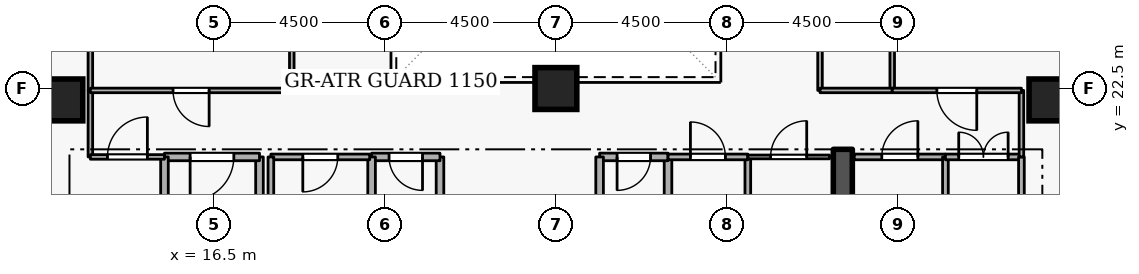
"""IFC4 building model, lengths in metres.
Left out: names, types, materials, properties, quantities, classifications, styles, units other than length and angle.
Written with IfcOpenShell. Run it as: python <this file> out.ifc"""

import sys

from ifc_helpers import new_model, si_unit, direction, frame, frame_2d, origin, origin_2d, place, context, subcontext, project, spatial, rectangle, extrude, element, fill, save


model = new_model("IFC4")
c1 = context("Model", 3, precision=1e-05, world=origin(), true_north=direction((0.0, 1.0)))
c2 = subcontext(c1, "Body", "Model", "MODEL_VIEW")
j1 = project(units=[si_unit("LENGTHUNIT", "METRE"), si_unit("PLANEANGLEUNIT", "RADIAN")], contexts=[c1])
p1 = place(None, origin())
s1 = spatial("IfcSite", under=j1, at=p1, CompositionType="ELEMENT")
p2 = place(p1, origin())
s2 = spatial("IfcBuilding", under=s1, at=p2, CompositionType="ELEMENT")
p3 = place(p2, frame((0.0, 0.0, 196.5)))
s3 = spatial("IfcBuildingStorey", under=s2, at=p3, CompositionType="ELEMENT", Elevation=196.5)
p4 = place(p3, frame((33.05, 15.1, 0.0), z_axis=(0.0, 0.0, 1.0), x_axis=(0.0, 1.0, 0.0)))
e1 = element("IfcWall", 1, at=p4, inside=s3, PredefinedType="SHEAR", context=c2, shape_type="SweptSolid", body=[
    extrude(rectangle(XDim=5.8, YDim=0.5, at=frame_2d((2.9, 0.0))), origin(), (0.0, 0.0, 1.0), 3.6),
])
for number, where, z_axis, x_axis in (
    (2, (12.5, 22.2, 0.0), (0.0, 0.0, 1.0), (1.0, 0.0, 0.0)),
    (3, (38.5, 22.2, 0.0), (0.0, 0.0, 1.0), (1.0, 0.0, 0.0)),
    (4, (25.5, 22.5, 0.0), (0.0, 0.0, 1.0), (1.0, 0.0, 0.0)),
):
    element("IfcColumn", number, at=place(p3, frame(where, z_axis=z_axis, x_axis=x_axis)), inside=s3, PredefinedType="COLUMN", context=c2, shape_type="SweptSolid", body=[
        extrude(rectangle(XDim=1.1, YDim=1.1, at=origin_2d()), origin(), (0.0, 0.0, 1.0), 3.6),
    ])
p5 = place(p3, frame((17.7, 18.4, 0.0), z_axis=(0.0, 0.0, 1.0), x_axis=(0.0, 1.0, 0.0)))
e5 = element("IfcWall", 5, at=p5, inside=s3, PredefinedType="STANDARD", context=c2, shape_type="SweptSolid", body=[
    extrude(rectangle(XDim=2.3, YDim=0.2, at=frame_2d((1.15, 0.0))), origin(), (0.0, 0.0, 1.0), 2.525),
])
p6 = place(p3, frame((17.7, 20.7, 0.0), z_axis=(0.0, 0.0, 1.0), x_axis=(-1.0, 0.0, 0.0)))
e6 = element("IfcWall", 6, at=p6, inside=s3, PredefinedType="STANDARD", context=c2, shape_type="SweptSolid", body=[
    extrude(rectangle(XDim=2.5, YDim=0.2, at=frame_2d((1.25, 0.0))), origin(), (0.0, 0.0, 1.0), 3.32),
])
p7 = place(p6, frame((0.675, 0.0, 0.0)))
e7 = element("IfcOpeningElement", 7, at=p7, cuts=e6, PredefinedType="OPENING", context=c2, shape_type="SweptSolid", body=[
    extrude(rectangle(XDim=1.15, YDim=2.1, at=frame_2d((0.575, 1.05))), frame((0.0, 0.11, 0.0), z_axis=(0.0, -1.0, 0.0), x_axis=(1.0, 0.0, 0.0)), (0.0, 0.0, 1.0), 0.22),
])
p8 = place(p3, frame((15.2, 20.7, 0.0), z_axis=(0.0, 0.0, 1.0), x_axis=(0.0, -1.0, 0.0)))
e8 = element("IfcWall", 8, at=p8, inside=s3, PredefinedType="STANDARD", context=c2, shape_type="SweptSolid", body=[
    extrude(rectangle(XDim=5.7, YDim=0.2, at=frame_2d((2.85, 0.0))), origin(), (0.0, 0.0, 1.0), 3.32),
])
p9 = place(p3, frame((28.45, 18.65, 0.0), z_axis=(0.0, 0.0, 1.0), x_axis=(0.0, 1.0, 0.0)))
e9 = element("IfcWall", 9, at=p9, inside=s3, PredefinedType="STANDARD", context=c2, shape_type="SweptSolid", body=[
    extrude(rectangle(XDim=2.05, YDim=0.2, at=frame_2d((1.025, 0.0))), origin(), (0.0, 0.0, 1.0), 3.32),
])
p10 = place(p3, frame((28.45, 20.7, 0.0), z_axis=(0.0, 0.0, 1.0), x_axis=(-1.0, 0.0, 0.0)))
e10 = element("IfcWall", 10, at=p10, inside=s3, PredefinedType="STANDARD", context=c2, shape_type="SweptSolid", body=[
    extrude(rectangle(XDim=1.8, YDim=0.2, at=frame_2d((0.9, 0.0))), origin(), (0.0, 0.0, 1.0), 3.32),
])
p11 = place(p10, frame((0.46, 0.0, 0.0)))
e11 = element("IfcOpeningElement", 11, at=p11, cuts=e10, PredefinedType="OPENING", context=c2, shape_type="SweptSolid", body=[
    extrude(rectangle(XDim=0.88, YDim=2.04, at=frame_2d((0.44, 1.02))), frame((0.0, 0.11, 0.0), z_axis=(0.0, -1.0, 0.0), x_axis=(1.0, 0.0, 0.0)), (0.0, 0.0, 1.0), 0.22),
])
for number, where, z_axis, x_axis in (
    (12, (26.65, 20.7, 0.0), (0.0, 0.0, 1.0), (0.0, -1.0, 0.0)),
    (13, (22.45, 18.65, 0.0), (0.0, 0.0, 1.0), (0.0, 1.0, 0.0)),
):
    element("IfcWall", number, at=place(p3, frame(where, z_axis=z_axis, x_axis=x_axis)), inside=s3, PredefinedType="STANDARD", context=c2, shape_type="SweptSolid", body=[
        extrude(rectangle(XDim=2.05, YDim=0.2, at=frame_2d((1.025, 0.0))), origin(), (0.0, 0.0, 1.0), 3.32),
    ])
p12 = place(p3, frame((22.45, 20.7, 0.0), z_axis=(0.0, 0.0, 1.0), x_axis=(-1.0, 0.0, 0.0)))
e14 = element("IfcWall", 14, at=p12, inside=s3, PredefinedType="STANDARD", context=c2, shape_type="SweptSolid", body=[
    extrude(rectangle(XDim=1.8, YDim=0.2, at=frame_2d((0.9, 0.0))), origin(), (0.0, 0.0, 1.0), 3.32),
])
p13 = place(p12, frame((0.46, 0.0, 0.0)))
e15 = element("IfcOpeningElement", 15, at=p13, cuts=e14, PredefinedType="OPENING", context=c2, shape_type="SweptSolid", body=[
    extrude(rectangle(XDim=0.88, YDim=2.04, at=frame_2d((0.44, 1.02))), frame((0.0, 0.11, 0.0), z_axis=(0.0, -1.0, 0.0), x_axis=(1.0, 0.0, 0.0)), (0.0, 0.0, 1.0), 0.22),
])
p14 = place(p3, frame((20.65, 20.7, 0.0), z_axis=(0.0, 0.0, 1.0), x_axis=(0.0, -1.0, 0.0)))
e16 = element("IfcWall", 16, at=p14, inside=s3, PredefinedType="STANDARD", context=c2, shape_type="SweptSolid", body=[
    extrude(rectangle(XDim=2.05, YDim=0.2, at=frame_2d((1.025, 0.0))), origin(), (0.0, 0.0, 1.0), 3.32),
])
p15 = place(p3, frame((20.6, 20.7, 0.0), z_axis=(0.0, 0.0, 1.0), x_axis=(-1.0, 0.0, 0.0)))
e17 = element("IfcWall", 17, at=p15, inside=s3, PredefinedType="PARTITIONING", context=c2, shape_type="SweptSolid", body=[
    extrude(rectangle(XDim=2.6, YDim=0.15, at=frame_2d((1.3, 0.0))), origin(), (0.0, 0.0, 1.0), 3.32),
])
p16 = place(p15, frame((0.84, 0.0, 0.0)))
e18 = element("IfcOpeningElement", 18, at=p16, cuts=e17, PredefinedType="OPENING", context=c2, shape_type="SweptSolid", body=[
    extrude(rectangle(XDim=0.92, YDim=2.08, at=frame_2d((0.46, 1.04))), frame((0.0, 0.085, 0.0), z_axis=(0.0, -1.0, 0.0), x_axis=(1.0, 0.0, 0.0)), (0.0, 0.0, 1.0), 0.17),
])
p17 = place(p3, frame((18.0, 20.7, 0.0), z_axis=(0.0, 0.0, 1.0), x_axis=(0.0, -1.0, 0.0)))
e19 = element("IfcWall", 19, at=p17, inside=s3, PredefinedType="PARTITIONING", context=c2, shape_type="SweptSolid", body=[
    extrude(rectangle(XDim=2.05, YDim=0.15, at=frame_2d((1.025, 0.0))), origin(), (0.0, 0.0, 1.0), 2.525),
])
p18 = place(p3, frame((30.55, 20.7, 0.0), z_axis=(0.0, 0.0, 1.0), x_axis=(0.0, -1.0, 0.0)))
e20 = element("IfcWall", 20, at=p18, inside=s3, PredefinedType="PARTITIONING", context=c2, shape_type="SweptSolid", body=[
    extrude(rectangle(XDim=2.05, YDim=0.15, at=frame_2d((1.025, 0.0))), origin(), (0.0, 0.0, 1.0), 3.32),
])
p19 = place(p3, frame((28.45, 20.7, 0.0), z_axis=(0.0, 0.0, 1.0), x_axis=(1.0, 0.0, 0.0)))
e21 = element("IfcWall", 21, at=p19, inside=s3, PredefinedType="PARTITIONING", context=c2, shape_type="SweptSolid", body=[
    extrude(rectangle(XDim=2.1, YDim=0.15, at=frame_2d((1.05, 0.0))), origin(), (0.0, 0.0, 1.0), 3.32),
])
p20 = place(p19, frame((0.59, 0.0, 0.0)))
e22 = element("IfcOpeningElement", 22, at=p20, cuts=e21, PredefinedType="OPENING", context=c2, shape_type="SweptSolid", body=[
    extrude(rectangle(XDim=0.92, YDim=2.08, at=frame_2d((0.46, 1.04))), frame((0.0, 0.085, 0.0), z_axis=(0.0, -1.0, 0.0), x_axis=(1.0, 0.0, 0.0)), (0.0, 0.0, 1.0), 0.17),
])
p21 = place(p3, frame((30.55, 20.7, 0.0), z_axis=(0.0, 0.0, 1.0), x_axis=(1.0, 0.0, 0.0)))
e23 = element("IfcWall", 23, at=p21, inside=s3, PredefinedType="PARTITIONING", context=c2, shape_type="SweptSolid", body=[
    extrude(rectangle(XDim=2.15, YDim=0.1, at=frame_2d((1.075, 0.0))), origin(), (0.0, 0.0, 1.0), 3.32),
])
p22 = place(p21, frame((0.6, 0.0, 0.0)))
e24 = element("IfcOpeningElement", 24, at=p22, cuts=e23, PredefinedType="OPENING", context=c2, shape_type="SweptSolid", body=[
    extrude(rectangle(XDim=0.95, YDim=2.1, at=frame_2d((0.475, 1.05))), frame((0.0, 0.06, 0.0), z_axis=(0.0, -1.0, 0.0), x_axis=(1.0, 0.0, 0.0)), (0.0, 0.0, 1.0), 0.12),
])
p23 = place(p3, frame((33.35, 20.7, 0.0), z_axis=(0.0, 0.0, 1.0), x_axis=(1.0, 0.0, 0.0)))
e25 = element("IfcWall", 25, at=p23, inside=s3, PredefinedType="PARTITIONING", context=c2, shape_type="SweptSolid", body=[
    extrude(rectangle(XDim=2.4, YDim=0.15, at=frame_2d((1.2, 0.0))), origin(), (0.0, 0.0, 1.0), 3.32),
])
p24 = place(p23, frame((0.725, 0.0, 0.0)))
e26 = element("IfcOpeningElement", 26, at=p24, cuts=e25, PredefinedType="OPENING", context=c2, shape_type="SweptSolid", body=[
    extrude(rectangle(XDim=0.95, YDim=2.1, at=frame_2d((0.475, 1.05))), frame((0.0, 0.085, 0.0), z_axis=(0.0, -1.0, 0.0), x_axis=(1.0, 0.0, 0.0)), (0.0, 0.0, 1.0), 0.17),
])
p25 = place(p3, frame((35.75, 20.7, 0.0), z_axis=(0.0, 0.0, 1.0), x_axis=(0.0, -1.0, 0.0)))
e27 = element("IfcWall", 27, at=p25, inside=s3, PredefinedType="PARTITIONING", context=c2, shape_type="SweptSolid", body=[
    extrude(rectangle(XDim=5.65, YDim=0.15, at=frame_2d((2.825, 0.0))), origin(), (0.0, 0.0, 1.0), 3.32),
])
p26 = place(p3, frame((35.75, 20.7, 0.0), z_axis=(0.0, 0.0, 1.0), x_axis=(1.0, 0.0, 0.0)))
e28 = element("IfcWall", 28, at=p26, inside=s3, PredefinedType="PARTITIONING", context=c2, shape_type="SweptSolid", body=[
    extrude(rectangle(XDim=2.0, YDim=0.15, at=frame_2d((1.0, 0.0))), origin(), (0.0, 0.0, 1.0), 3.32),
])
p27 = place(p26, frame((0.35, 0.0, 0.0)))
e29 = element("IfcOpeningElement", 29, at=p27, cuts=e28, PredefinedType="OPENING", context=c2, shape_type="SweptSolid", body=[
    extrude(rectangle(XDim=1.3, YDim=2.12, at=frame_2d((0.65, 1.06))), frame((0.0, 0.085, 0.0), z_axis=(0.0, -1.0, 0.0), x_axis=(1.0, 0.0, 0.0)), (0.0, 0.0, 1.0), 0.17),
])
p28 = place(p3, frame((37.75, 20.7, 0.0), z_axis=(0.0, 0.0, 1.0), x_axis=(0.0, -1.0, 0.0)))
e30 = element("IfcWall", 30, at=p28, inside=s3, PredefinedType="PARTITIONING", context=c2, shape_type="SweptSolid", body=[
    extrude(rectangle(XDim=5.65, YDim=0.15, at=frame_2d((2.825, 0.0))), origin(), (0.0, 0.0, 1.0), 3.32),
])
p29 = place(p3, frame((13.25, 27.0, 0.0), z_axis=(0.0, 0.0, 1.0), x_axis=(0.0, -1.0, 0.0)))
e31 = element("IfcWall", 31, at=p29, inside=s3, PredefinedType="PARTITIONING", context=c2, shape_type="SweptSolid", body=[
    extrude(rectangle(XDim=4.55, YDim=0.12, at=frame_2d((2.275, 0.0))), origin(), (0.0, 0.0, 1.0), 3.32),
])
p30 = place(p3, frame((13.25, 22.45, 0.0), z_axis=(0.0, 0.0, 1.0), x_axis=(0.0, -1.0, 0.0)))
e32 = element("IfcWall", 32, at=p30, inside=s3, PredefinedType="PARTITIONING", context=c2, shape_type="SweptSolid", body=[
    extrude(rectangle(XDim=1.75, YDim=0.12, at=frame_2d((0.875, 0.0))), origin(), (0.0, 0.0, 1.0), 3.32),
])
p31 = place(p3, frame((13.25, 20.7, 0.0), z_axis=(0.0, 0.0, 1.0), x_axis=(1.0, 0.0, 0.0)))
e33 = element("IfcWall", 33, at=p31, inside=s3, PredefinedType="PARTITIONING", context=c2, shape_type="SweptSolid", body=[
    extrude(rectangle(XDim=1.95, YDim=0.12, at=frame_2d((0.975, 0.0))), origin(), (0.0, 0.0, 1.0), 3.32),
])
p32 = place(p31, frame((0.45, 0.0, 0.0)))
e34 = element("IfcOpeningElement", 34, at=p32, cuts=e33, PredefinedType="OPENING", context=c2, shape_type="SweptSolid", body=[
    extrude(rectangle(XDim=1.05, YDim=2.1, at=frame_2d((0.525, 1.05))), frame((0.0, 0.07, 0.0), z_axis=(0.0, -1.0, 0.0), x_axis=(1.0, 0.0, 0.0)), (0.0, 0.0, 1.0), 0.14),
])
p33 = place(p3, frame((18.55, 27.0, 0.0), z_axis=(0.0, 0.0, 1.0), x_axis=(0.0, -1.0, 0.0)))
e35 = element("IfcWall", 35, at=p33, inside=s3, PredefinedType="PARTITIONING", context=c2, shape_type="SweptSolid", body=[
    extrude(rectangle(XDim=4.55, YDim=0.12, at=frame_2d((2.275, 0.0))), origin(), (0.0, 0.0, 1.0), 3.32),
])
p34 = place(p3, frame((18.55, 22.45, 0.0), z_axis=(0.0, 0.0, 1.0), x_axis=(-1.0, 0.0, 0.0)))
e36 = element("IfcWall", 36, at=p34, inside=s3, PredefinedType="PARTITIONING", context=c2, shape_type="SweptSolid", body=[
    extrude(rectangle(XDim=5.3, YDim=0.12, at=frame_2d((2.65, 0.0))), origin(), (0.0, 0.0, 1.0), 3.32),
])
p35 = place(p34, frame((2.175, 0.0, 0.0)))
e37 = element("IfcOpeningElement", 37, at=p35, cuts=e36, PredefinedType="OPENING", context=c2, shape_type="SweptSolid", body=[
    extrude(rectangle(XDim=0.95, YDim=2.1, at=frame_2d((0.475, 1.05))), frame((0.0, 0.07, 0.0), z_axis=(0.0, -1.0, 0.0), x_axis=(1.0, 0.0, 0.0)), (0.0, 0.0, 1.0), 0.14),
])
p36 = place(p3, frame((32.45, 22.45, 0.0), z_axis=(0.0, 0.0, 1.0), x_axis=(0.0, 1.0, 0.0)))
e38 = element("IfcWall", 38, at=p36, inside=s3, PredefinedType="PARTITIONING", context=c2, shape_type="SweptSolid", body=[
    extrude(rectangle(XDim=4.55, YDim=0.12, at=frame_2d((2.275, 0.0))), origin(), (0.0, 0.0, 1.0), 3.32),
])
p37 = place(p36, frame((1.8, 0.0, 0.0)))
e39 = element("IfcOpeningElement", 39, at=p37, cuts=e38, PredefinedType="OPENING", context=c2, shape_type="SweptSolid", body=[
    extrude(rectangle(XDim=0.95, YDim=2.1, at=frame_2d((0.475, 1.05))), frame((0.0, 0.07, 0.0), z_axis=(0.0, -1.0, 0.0), x_axis=(1.0, 0.0, 0.0)), (0.0, 0.0, 1.0), 0.14),
])
p38 = place(p3, frame((34.35, 27.0, 0.0), z_axis=(0.0, 0.0, 1.0), x_axis=(0.0, -1.0, 0.0)))
e40 = element("IfcWall", 40, at=p38, inside=s3, PredefinedType="PARTITIONING", context=c2, shape_type="SweptSolid", body=[
    extrude(rectangle(XDim=4.55, YDim=0.12, at=frame_2d((2.275, 0.0))), origin(), (0.0, 0.0, 1.0), 3.32),
])
p39 = place(p3, frame((34.35, 22.45, 0.0), z_axis=(0.0, 0.0, 1.0), x_axis=(-1.0, 0.0, 0.0)))
e41 = element("IfcWall", 41, at=p39, inside=s3, PredefinedType="PARTITIONING", context=c2, shape_type="SweptSolid", body=[
    extrude(rectangle(XDim=1.9, YDim=0.12, at=frame_2d((0.95, 0.0))), origin(), (0.0, 0.0, 1.0), 3.32),
])
p40 = place(p3, frame((37.75, 20.7, 0.0), z_axis=(0.0, 0.0, 1.0), x_axis=(0.0, 1.0, 0.0)))
e42 = element("IfcWall", 42, at=p40, inside=s3, PredefinedType="PARTITIONING", context=c2, shape_type="SweptSolid", body=[
    extrude(rectangle(XDim=1.75, YDim=0.12, at=frame_2d((0.875, 0.0))), origin(), (0.0, 0.0, 1.0), 3.32),
])
p41 = place(p3, frame((37.75, 22.45, 0.0), z_axis=(0.0, 0.0, 1.0), x_axis=(-1.0, 0.0, 0.0)))
e43 = element("IfcWall", 43, at=p41, inside=s3, PredefinedType="PARTITIONING", context=c2, shape_type="SweptSolid", body=[
    extrude(rectangle(XDim=3.4, YDim=0.12, at=frame_2d((1.7, 0.0))), origin(), (0.0, 0.0, 1.0), 3.32),
])
p42 = place(p41, frame((1.175, 0.0, 0.0)))
e44 = element("IfcOpeningElement", 44, at=p42, cuts=e43, PredefinedType="OPENING", context=c2, shape_type="SweptSolid", body=[
    extrude(rectangle(XDim=1.05, YDim=2.1, at=frame_2d((0.525, 1.05))), frame((0.0, 0.07, 0.0), z_axis=(0.0, -1.0, 0.0), x_axis=(1.0, 0.0, 0.0)), (0.0, 0.0, 1.0), 0.14),
])
p43 = place(p7, origin())
e45 = element("IfcDoor", 45, at=p43, inside=s3, OperationType="SINGLE_SWING_RIGHT", PredefinedType="DOOR", context=c2, shape_type="SweptSolid", body=[
    extrude(rectangle(XDim=1.15, YDim=2.1, at=frame_2d((0.575, 1.05))), frame((0.0, 0.025, 0.0), z_axis=(0.0, -1.0, 0.0), x_axis=(1.0, 0.0, 0.0)), (0.0, 0.0, 1.0), 0.05),
])
fill(e7, e45)
p44 = place(p11, origin())
e46 = element("IfcDoor", 46, at=p44, inside=s3, OperationType="SINGLE_SWING_RIGHT", PredefinedType="DOOR", context=c2, shape_type="SweptSolid", body=[
    extrude(rectangle(XDim=0.88, YDim=2.04, at=frame_2d((0.44, 1.02))), frame((0.0, 0.025, 0.0), z_axis=(0.0, -1.0, 0.0), x_axis=(1.0, 0.0, 0.0)), (0.0, 0.0, 1.0), 0.05),
])
fill(e11, e46)
p45 = place(p13, origin())
e47 = element("IfcDoor", 47, at=p45, inside=s3, OperationType="SINGLE_SWING_LEFT", PredefinedType="DOOR", context=c2, shape_type="SweptSolid", body=[
    extrude(rectangle(XDim=0.88, YDim=2.04, at=frame_2d((0.44, 1.02))), frame((0.0, 0.025, 0.0), z_axis=(0.0, -1.0, 0.0), x_axis=(1.0, 0.0, 0.0)), (0.0, 0.0, 1.0), 0.05),
])
fill(e15, e47)
p46 = place(p16, origin())
e48 = element("IfcDoor", 48, at=p46, inside=s3, OperationType="SINGLE_SWING_RIGHT", PredefinedType="DOOR", context=c2, shape_type="SweptSolid", body=[
    extrude(rectangle(XDim=0.92, YDim=2.08, at=frame_2d((0.46, 1.04))), frame((0.0, 0.025, 0.0), z_axis=(0.0, -1.0, 0.0), x_axis=(1.0, 0.0, 0.0)), (0.0, 0.0, 1.0), 0.05),
])
fill(e18, e48)
p47 = place(p20, origin())
e49 = element("IfcDoor", 49, at=p47, inside=s3, OperationType="SINGLE_SWING_LEFT", PredefinedType="DOOR", context=c2, shape_type="SweptSolid", body=[
    extrude(rectangle(XDim=0.92, YDim=2.08, at=frame_2d((0.46, 1.04))), frame((0.0, 0.025, 0.0), z_axis=(0.0, -1.0, 0.0), x_axis=(1.0, 0.0, 0.0)), (0.0, 0.0, 1.0), 0.05),
])
fill(e22, e49)
p48 = place(p22, origin())
e50 = element("IfcDoor", 50, at=p48, inside=s3, OperationType="SINGLE_SWING_RIGHT", PredefinedType="DOOR", context=c2, shape_type="SweptSolid", body=[
    extrude(rectangle(XDim=0.95, YDim=2.1, at=frame_2d((0.475, 1.05))), frame((0.0, 0.025, 0.0), z_axis=(0.0, -1.0, 0.0), x_axis=(1.0, 0.0, 0.0)), (0.0, 0.0, 1.0), 0.05),
])
fill(e24, e50)
p49 = place(p24, origin())
e51 = element("IfcDoor", 51, at=p49, inside=s3, OperationType="SINGLE_SWING_RIGHT", PredefinedType="DOOR", context=c2, shape_type="SweptSolid", body=[
    extrude(rectangle(XDim=0.95, YDim=2.1, at=frame_2d((0.475, 1.05))), frame((0.0, 0.025, 0.0), z_axis=(0.0, -1.0, 0.0), x_axis=(1.0, 0.0, 0.0)), (0.0, 0.0, 1.0), 0.05),
])
fill(e26, e51)
p50 = place(p27, origin())
e52 = element("IfcDoor", 52, at=p50, inside=s3, OperationType="DOUBLE_DOOR_SINGLE_SWING", PredefinedType="DOOR", context=c2, shape_type="SweptSolid", body=[
    extrude(rectangle(XDim=1.3, YDim=2.12, at=frame_2d((0.65, 1.06))), frame((0.0, 0.025, 0.0), z_axis=(0.0, -1.0, 0.0), x_axis=(1.0, 0.0, 0.0)), (0.0, 0.0, 1.0), 0.05),
])
fill(e29, e52)
p51 = place(p32, origin())
e53 = element("IfcDoor", 53, at=p51, inside=s3, OperationType="SINGLE_SWING_RIGHT", PredefinedType="DOOR", context=c2, shape_type="SweptSolid", body=[
    extrude(rectangle(XDim=1.05, YDim=2.1, at=frame_2d((0.525, 1.05))), frame((0.0, 0.025, 0.0), z_axis=(0.0, -1.0, 0.0), x_axis=(1.0, 0.0, 0.0)), (0.0, 0.0, 1.0), 0.05),
])
fill(e34, e53)
p52 = place(p35, origin())
e54 = element("IfcDoor", 54, at=p52, inside=s3, OperationType="SINGLE_SWING_LEFT", PredefinedType="DOOR", context=c2, shape_type="SweptSolid", body=[
    extrude(rectangle(XDim=0.95, YDim=2.1, at=frame_2d((0.475, 1.05))), frame((0.0, 0.025, 0.0), z_axis=(0.0, -1.0, 0.0), x_axis=(1.0, 0.0, 0.0)), (0.0, 0.0, 1.0), 0.05),
])
fill(e37, e54)
p53 = place(p42, origin())
e55 = element("IfcDoor", 55, at=p53, inside=s3, OperationType="SINGLE_SWING_LEFT", PredefinedType="DOOR", context=c2, shape_type="SweptSolid", body=[
    extrude(rectangle(XDim=1.05, YDim=2.1, at=frame_2d((0.525, 1.05))), frame((0.0, 0.025, 0.0), z_axis=(0.0, -1.0, 0.0), x_axis=(1.0, 0.0, 0.0)), (0.0, 0.0, 1.0), 0.05),
])
fill(e44, e55)
save(model, sys.argv[1])
